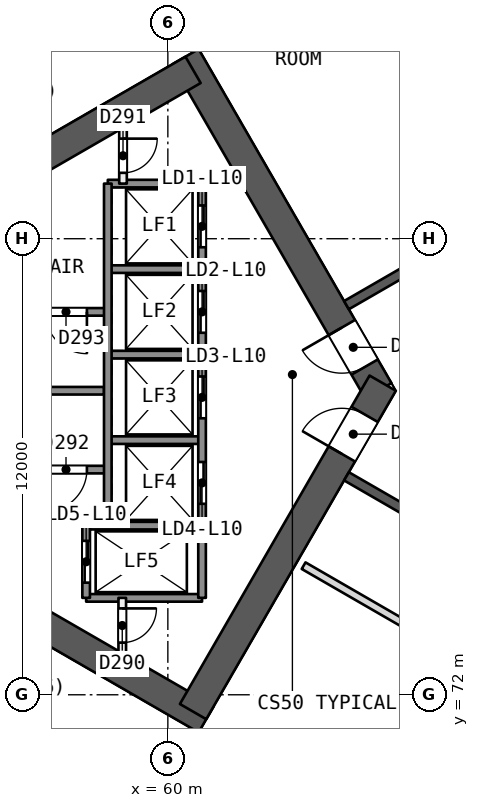
"""IFC4 building model, lengths in metres.
Left out: names, types, materials, properties, quantities, classifications, styles, units other than length and angle.
Written with IfcOpenShell. Run it as: python <this file> out.ifc"""

import sys

from ifc_helpers import new_model, si_unit, direction, frame, frame_2d, origin, place, context, subcontext, project, spatial, rectangle, extrude, element, fill, save


model = new_model("IFC4")
c1 = context("Model", 3, precision=1e-05, world=origin(), true_north=direction((0.0, 1.0)))
c2 = subcontext(c1, "Body", "Model", "MODEL_VIEW")
j1 = project(units=[si_unit("LENGTHUNIT", "METRE"), si_unit("PLANEANGLEUNIT", "RADIAN")], contexts=[c1])
p1 = place(None, origin())
s1 = spatial("IfcSite", under=j1, at=p1, CompositionType="ELEMENT")
p2 = place(p1, origin())
s2 = spatial("IfcBuilding", under=s1, at=p2, CompositionType="ELEMENT")
p3 = place(p2, frame((0.0, 0.0, 48.5)))
s3 = spatial("IfcBuildingStorey", under=s2, at=p3, CompositionType="ELEMENT", Elevation=48.5)
p4 = place(p3, frame((65.538, 80.0, 0.0), z_axis=(0.0, 0.0, 1.0), x_axis=(-0.49999662545, 0.866027352073, 0.0)))
e1 = element("IfcWall", 1, at=p4, inside=s3, PredefinedType="SHEAR", context=c2, shape_type="SweptSolid", body=[
    extrude(rectangle(XDim=10.149, YDim=0.8, at=frame_2d((5.074, 0.0))), origin(), (0.0, 0.0, 1.0), 4.4),
])
p5 = place(p4, frame((0.719, 0.0, 0.0)))
e2 = element("IfcOpeningElement", 2, at=p5, cuts=e1, PredefinedType="OPENING", context=c2, shape_type="SweptSolid", body=[
    extrude(rectangle(XDim=1.2, YDim=2.1, at=frame_2d((0.6, 1.05))), frame((0.0, 0.411, 0.0), z_axis=(0.0, -1.0, 0.0), x_axis=(1.0, 0.0, 0.0)), (0.0, 0.0, 1.0), 0.821),
])
p6 = place(p3, frame((60.664, 88.443, 0.0), z_axis=(0.0, 0.0, 1.0), x_axis=(-0.866029478545, -0.499992942241, 0.0)))
e3 = element("IfcWall", 3, at=p6, inside=s3, PredefinedType="SHEAR", context=c2, shape_type="SweptSolid", body=[
    extrude(rectangle(XDim=13.933, YDim=0.8, at=frame_2d((6.967, 0.0))), origin(), (0.0, 0.0, 1.0), 4.4),
])
p7 = place(p3, frame((48.797, 78.408, 0.0), z_axis=(0.0, 0.0, 1.0), x_axis=(0.866032504327, -0.499987701298, 0.0)))
e4 = element("IfcWall", 4, at=p7, inside=s3, PredefinedType="SHEAR", context=c2, shape_type="SweptSolid", body=[
    extrude(rectangle(XDim=14.102, YDim=0.8, at=frame_2d((7.051, 0.0))), origin(), (0.0, 0.0, 1.0), 4.4),
])
p8 = place(p3, frame((60.664, 71.557, 0.0), z_axis=(0.0, 0.0, 1.0), x_axis=(0.50000409368, 0.866023040284, 0.0)))
e5 = element("IfcWall", 5, at=p8, inside=s3, PredefinedType="SHEAR", context=c2, shape_type="SweptSolid", body=[
    extrude(rectangle(XDim=9.98, YDim=0.8, at=frame_2d((4.99, 0.0))), origin(), (0.0, 0.0, 1.0), 4.4),
])
p9 = place(p8, frame((7.83, 0.0, 0.0)))
e6 = element("IfcOpeningElement", 6, at=p9, cuts=e5, PredefinedType="OPENING", context=c2, shape_type="SweptSolid", body=[
    extrude(rectangle(XDim=1.2, YDim=2.1, at=frame_2d((0.6, 1.05))), frame((0.0, 0.411, 0.0), z_axis=(0.0, -1.0, 0.0), x_axis=(1.0, 0.0, 0.0)), (0.0, 0.0, 1.0), 0.821),
])
p10 = place(p3, frame((78.2, 90.046, 0.0), z_axis=(0.0, 0.0, 1.0), x_axis=(-0.866026492143, -0.499998114903, 0.0)))
e7 = element("IfcWall", 7, at=p10, inside=s3, PredefinedType="SHEAR", context=c2, shape_type="SweptSolid", body=[
    extrude(rectangle(XDim=15.588, YDim=0.25, at=frame_2d((7.794, 0.0))), origin(), (0.0, 0.0, 1.0), 3.9),
])
p11 = place(p10, frame((2.05, 0.0, 0.0)))
e8 = element("IfcOpeningElement", 8, at=p11, cuts=e7, PredefinedType="OPENING", context=c2, shape_type="SweptSolid", body=[
    extrude(rectangle(XDim=1.2, YDim=2.4, at=frame_2d((0.6, 1.2))), frame((0.0, 0.135, 0.0), z_axis=(0.0, -1.0, 0.0), x_axis=(1.0, 0.0, 0.0)), (0.0, 0.0, 1.0), 0.271),
])
p12 = place(p10, frame((7.272, 0.0, 0.0)))
e9 = element("IfcOpeningElement", 9, at=p12, cuts=e7, PredefinedType="OPENING", context=c2, shape_type="SweptSolid", body=[
    extrude(rectangle(XDim=1.2, YDim=2.4, at=frame_2d((0.6, 1.2))), frame((0.0, 0.135, 0.0), z_axis=(0.0, -1.0, 0.0), x_axis=(1.0, 0.0, 0.0)), (0.0, 0.0, 1.0), 0.271),
])
p13 = place(p10, frame((12.417, 0.0, 0.0)))
e10 = element("IfcOpeningElement", 10, at=p13, cuts=e7, PredefinedType="OPENING", context=c2, shape_type="SweptSolid", body=[
    extrude(rectangle(XDim=1.2, YDim=2.4, at=frame_2d((0.6, 1.2))), frame((0.0, 0.135, 0.0), z_axis=(0.0, -1.0, 0.0), x_axis=(1.0, 0.0, 0.0)), (0.0, 0.0, 1.0), 0.271),
])
p14 = place(p3, frame((64.7, 77.748, 0.0), z_axis=(0.0, 0.0, 1.0), x_axis=(0.866026492143, -0.499998114903, 0.0)))
e11 = element("IfcWall", 11, at=p14, inside=s3, PredefinedType="SHEAR", context=c2, shape_type="SweptSolid", body=[
    extrude(rectangle(XDim=15.588, YDim=0.25, at=frame_2d((7.794, 0.0))), origin(), (0.0, 0.0, 1.0), 3.9),
])
p15 = place(p14, frame((3.297, 0.0, 0.0)))
e12 = element("IfcOpeningElement", 12, at=p15, cuts=e11, PredefinedType="OPENING", context=c2, shape_type="SweptSolid", body=[
    extrude(rectangle(XDim=1.2, YDim=2.4, at=frame_2d((0.6, 1.2))), frame((0.0, 0.135, 0.0), z_axis=(0.0, -1.0, 0.0), x_axis=(1.0, 0.0, 0.0)), (0.0, 0.0, 1.0), 0.271),
])
p16 = place(p14, frame((9.143, 0.0, 0.0)))
e13 = element("IfcOpeningElement", 13, at=p16, cuts=e11, PredefinedType="OPENING", context=c2, shape_type="SweptSolid", body=[
    extrude(rectangle(XDim=1.2, YDim=2.4, at=frame_2d((0.6, 1.2))), frame((0.0, 0.135, 0.0), z_axis=(0.0, -1.0, 0.0), x_axis=(1.0, 0.0, 0.0)), (0.0, 0.0, 1.0), 0.271),
])
p17 = place(p14, frame((13.04, 0.0, 0.0)))
e14 = element("IfcOpeningElement", 14, at=p17, cuts=e11, PredefinedType="OPENING", context=c2, shape_type="SweptSolid", body=[
    extrude(rectangle(XDim=1.2, YDim=2.4, at=frame_2d((0.6, 1.2))), frame((0.0, 0.135, 0.0), z_axis=(0.0, -1.0, 0.0), x_axis=(1.0, 0.0, 0.0)), (0.0, 0.0, 1.0), 0.271),
])
p18 = place(p3, frame((62.216, 96.842, 0.0), z_axis=(0.0, 0.0, 1.0), x_axis=(0.499997074782, -0.866027092653, 0.0)))
e15 = element("IfcWall", 15, at=p18, inside=s3, PredefinedType="PARTITIONING", context=c2, shape_type="SweptSolid", body=[
    extrude(rectangle(XDim=13.877, YDim=0.2, at=frame_2d((6.939, 0.0))), origin(), (0.0, 0.0, 1.0), 3.9),
])
p19 = place(p3, frame((63.572, 75.397, 0.0), z_axis=(0.0, 0.0, 1.0), x_axis=(0.866024999478, -0.500000700278, 0.0)))
e16 = element("IfcWall", 16, at=p19, inside=s3, PredefinedType="PARTITIONING", context=c2, shape_type="SweptSolid", body=[
    extrude(rectangle(XDim=7.595, YDim=0.2, at=frame_2d((3.798, 0.0))), origin(), (0.0, 0.0, 1.0), 3.9),
])
p20 = place(p19, frame((3.198, 0.0, 0.0)))
e17 = element("IfcOpeningElement", 17, at=p20, cuts=e16, PredefinedType="OPENING", context=c2, shape_type="SweptSolid", body=[
    extrude(rectangle(XDim=1.2, YDim=2.4, at=frame_2d((0.6, 1.2))), frame((0.0, 0.11, 0.0), z_axis=(0.0, -1.0, 0.0), x_axis=(1.0, 0.0, 0.0)), (0.0, 0.0, 1.0), 0.221),
])
p21 = place(p3, frame((64.511, 61.833, 0.0), z_axis=(0.0, 0.0, 1.0), x_axis=(0.499997074782, 0.866027092653, 0.0)))
e18 = element("IfcWall", 18, at=p21, inside=s3, PredefinedType="PARTITIONING", context=c2, shape_type="SweptSolid", body=[
    extrude(rectangle(XDim=13.877, YDim=0.2, at=frame_2d((6.939, 0.0))), origin(), (0.0, 0.0, 1.0), 3.9),
])
p22 = place(p3, frame((38.131, 83.108, 0.0), z_axis=(0.0, 0.0, 1.0), x_axis=(0.866025105017, 0.50000051748, 0.0)))
e19 = element("IfcWall", 19, at=p22, inside=s3, PredefinedType="SOLIDWALL", context=c2, shape_type="SweptSolid", body=[
    extrude(rectangle(XDim=60.751, YDim=0.3, at=frame_2d((30.375, 0.0))), origin(), (0.0, 0.0, 1.0), 3.9),
])
p23 = place(p22, frame((3.562, 0.0, 0.6)))
e20 = element("IfcOpeningElement", 20, at=p23, cuts=e19, PredefinedType="OPENING", context=c2, shape_type="SweptSolid", body=[
    extrude(rectangle(XDim=3.0, YDim=2.4, at=frame_2d((1.5, 1.2))), frame((0.0, 0.161, 0.0), z_axis=(0.0, -1.0, 0.0), x_axis=(1.0, 0.0, 0.0)), (0.0, 0.0, 1.0), 0.321),
])
p24 = place(p22, frame((13.688, 0.0, 0.6)))
e21 = element("IfcOpeningElement", 21, at=p24, cuts=e19, PredefinedType="OPENING", context=c2, shape_type="SweptSolid", body=[
    extrude(rectangle(XDim=3.0, YDim=2.4, at=frame_2d((1.5, 1.2))), frame((0.0, 0.161, 0.0), z_axis=(0.0, -1.0, 0.0), x_axis=(1.0, 0.0, 0.0)), (0.0, 0.0, 1.0), 0.321),
])
p25 = place(p22, frame((23.813, 0.0, 0.6)))
e22 = element("IfcOpeningElement", 22, at=p25, cuts=e19, PredefinedType="OPENING", context=c2, shape_type="SweptSolid", body=[
    extrude(rectangle(XDim=3.0, YDim=2.4, at=frame_2d((1.5, 1.2))), frame((0.0, 0.161, 0.0), z_axis=(0.0, -1.0, 0.0), x_axis=(1.0, 0.0, 0.0)), (0.0, 0.0, 1.0), 0.321),
])
p26 = place(p22, frame((33.938, 0.0, 0.6)))
e23 = element("IfcOpeningElement", 23, at=p26, cuts=e19, PredefinedType="OPENING", context=c2, shape_type="SweptSolid", body=[
    extrude(rectangle(XDim=3.0, YDim=2.4, at=frame_2d((1.5, 1.2))), frame((0.0, 0.161, 0.0), z_axis=(0.0, -1.0, 0.0), x_axis=(1.0, 0.0, 0.0)), (0.0, 0.0, 1.0), 0.321),
])
p27 = place(p22, frame((44.063, 0.0, 0.6)))
e24 = element("IfcOpeningElement", 24, at=p27, cuts=e19, PredefinedType="OPENING", context=c2, shape_type="SweptSolid", body=[
    extrude(rectangle(XDim=3.0, YDim=2.4, at=frame_2d((1.5, 1.2))), frame((0.0, 0.161, 0.0), z_axis=(0.0, -1.0, 0.0), x_axis=(1.0, 0.0, 0.0)), (0.0, 0.0, 1.0), 0.321),
])
p28 = place(p22, frame((54.188, 0.0, 0.6)))
e25 = element("IfcOpeningElement", 25, at=p28, cuts=e19, PredefinedType="OPENING", context=c2, shape_type="SweptSolid", body=[
    extrude(rectangle(XDim=3.0, YDim=2.4, at=frame_2d((1.5, 1.2))), frame((0.0, 0.161, 0.0), z_axis=(0.0, -1.0, 0.0), x_axis=(1.0, 0.0, 0.0)), (0.0, 0.0, 1.0), 0.321),
])
p29 = place(p3, frame((90.743, 46.516, 0.0), z_axis=(0.0, 0.0, 1.0), x_axis=(-0.866025105017, 0.50000051748, 0.0)))
e26 = element("IfcWall", 26, at=p29, inside=s3, PredefinedType="SOLIDWALL", context=c2, shape_type="SweptSolid", body=[
    extrude(rectangle(XDim=60.751, YDim=0.3, at=frame_2d((30.375, 0.0))), origin(), (0.0, 0.0, 1.0), 3.9),
])
p30 = place(p29, frame((3.562, 0.0, 0.6)))
e27 = element("IfcOpeningElement", 27, at=p30, cuts=e26, PredefinedType="OPENING", context=c2, shape_type="SweptSolid", body=[
    extrude(rectangle(XDim=3.0, YDim=2.4, at=frame_2d((1.5, 1.2))), frame((0.0, 0.161, 0.0), z_axis=(0.0, -1.0, 0.0), x_axis=(1.0, 0.0, 0.0)), (0.0, 0.0, 1.0), 0.321),
])
p31 = place(p29, frame((13.688, 0.0, 0.6)))
e28 = element("IfcOpeningElement", 28, at=p31, cuts=e26, PredefinedType="OPENING", context=c2, shape_type="SweptSolid", body=[
    extrude(rectangle(XDim=3.0, YDim=2.4, at=frame_2d((1.5, 1.2))), frame((0.0, 0.161, 0.0), z_axis=(0.0, -1.0, 0.0), x_axis=(1.0, 0.0, 0.0)), (0.0, 0.0, 1.0), 0.321),
])
p32 = place(p29, frame((23.813, 0.0, 0.6)))
e29 = element("IfcOpeningElement", 29, at=p32, cuts=e26, PredefinedType="OPENING", context=c2, shape_type="SweptSolid", body=[
    extrude(rectangle(XDim=3.0, YDim=2.4, at=frame_2d((1.5, 1.2))), frame((0.0, 0.161, 0.0), z_axis=(0.0, -1.0, 0.0), x_axis=(1.0, 0.0, 0.0)), (0.0, 0.0, 1.0), 0.321),
])
p33 = place(p29, frame((33.938, 0.0, 0.6)))
e30 = element("IfcOpeningElement", 30, at=p33, cuts=e26, PredefinedType="OPENING", context=c2, shape_type="SweptSolid", body=[
    extrude(rectangle(XDim=3.0, YDim=2.4, at=frame_2d((1.5, 1.2))), frame((0.0, 0.161, 0.0), z_axis=(0.0, -1.0, 0.0), x_axis=(1.0, 0.0, 0.0)), (0.0, 0.0, 1.0), 0.321),
])
p34 = place(p29, frame((44.063, 0.0, 0.6)))
e31 = element("IfcOpeningElement", 31, at=p34, cuts=e26, PredefinedType="OPENING", context=c2, shape_type="SweptSolid", body=[
    extrude(rectangle(XDim=3.0, YDim=2.4, at=frame_2d((1.5, 1.2))), frame((0.0, 0.161, 0.0), z_axis=(0.0, -1.0, 0.0), x_axis=(1.0, 0.0, 0.0)), (0.0, 0.0, 1.0), 0.321),
])
p35 = place(p29, frame((54.188, 0.0, 0.6)))
e32 = element("IfcOpeningElement", 32, at=p35, cuts=e26, PredefinedType="OPENING", context=c2, shape_type="SweptSolid", body=[
    extrude(rectangle(XDim=3.0, YDim=2.4, at=frame_2d((1.5, 1.2))), frame((0.0, 0.161, 0.0), z_axis=(0.0, -1.0, 0.0), x_axis=(1.0, 0.0, 0.0)), (0.0, 0.0, 1.0), 0.321),
])
for number, where, z_axis, x_axis in (
    (33, (60.9, 85.45, 0.0), (0.0, 0.0, 1.0), (-1.0, 0.0, 0.0)),
    (34, (60.9, 83.2, 0.0), (0.0, 0.0, 1.0), (-1.0, 0.0, 0.0)),
):
    element("IfcWall", number, at=place(p3, frame(where, z_axis=z_axis, x_axis=x_axis)), inside=s3, PredefinedType="SOLIDWALL", context=c2, shape_type="SweptSolid", body=[
        extrude(rectangle(XDim=2.48, YDim=0.2, at=frame_2d((1.24, 0.0))), origin(), (0.0, 0.0, 1.0), 3.9),
    ])
p36 = place(p3, frame((58.42, 82.075, 0.0), z_axis=(0.0, 0.0, 1.0), x_axis=(-1.0, 0.0, 0.0)))
e35 = element("IfcWall", 35, at=p36, inside=s3, PredefinedType="SOLIDWALL", context=c2, shape_type="SweptSolid", body=[
    extrude(rectangle(XDim=7.7, YDim=0.2, at=frame_2d((3.85, 0.0))), origin(), (0.0, 0.0, 1.0), 3.9),
])
p37 = place(p36, frame((0.55, 0.0, 0.0)))
e36 = element("IfcOpeningElement", 36, at=p37, cuts=e35, PredefinedType="OPENING", context=c2, shape_type="SweptSolid", body=[
    extrude(rectangle(XDim=1.1, YDim=2.1, at=frame_2d((0.55, 1.05))), frame((0.0, 0.11, 0.0), z_axis=(0.0, -1.0, 0.0), x_axis=(1.0, 0.0, 0.0)), (0.0, 0.0, 1.0), 0.221),
])
p38 = place(p3, frame((60.9, 80.95, 0.0), z_axis=(0.0, 0.0, 1.0), x_axis=(-1.0, 0.0, 0.0)))
e37 = element("IfcWall", 37, at=p38, inside=s3, PredefinedType="SOLIDWALL", context=c2, shape_type="SweptSolid", body=[
    extrude(rectangle(XDim=2.48, YDim=0.2, at=frame_2d((1.24, 0.0))), origin(), (0.0, 0.0, 1.0), 3.9),
])
p39 = place(p3, frame((58.32, 80.0, 0.0), z_axis=(0.0, 0.0, 1.0), x_axis=(-1.0, 0.0, 0.0)))
e38 = element("IfcWall", 38, at=p39, inside=s3, PredefinedType="SOLIDWALL", context=c2, shape_type="SweptSolid", body=[
    extrude(rectangle(XDim=2.2, YDim=0.2, at=frame_2d((1.1, 0.0))), origin(), (0.0, 0.0, 1.0), 3.9),
])
p40 = place(p3, frame((60.9, 78.7, 0.0), z_axis=(0.0, 0.0, 1.0), x_axis=(-1.0, 0.0, 0.0)))
e39 = element("IfcWall", 39, at=p40, inside=s3, PredefinedType="SOLIDWALL", context=c2, shape_type="SweptSolid", body=[
    extrude(rectangle(XDim=2.48, YDim=0.2, at=frame_2d((1.24, 0.0))), origin(), (0.0, 0.0, 1.0), 3.9),
])
p41 = place(p3, frame((58.42, 77.925, 0.0), z_axis=(0.0, 0.0, 1.0), x_axis=(-1.0, 0.0, 0.0)))
e40 = element("IfcWall", 40, at=p41, inside=s3, PredefinedType="SOLIDWALL", context=c2, shape_type="SweptSolid", body=[
    extrude(rectangle(XDim=7.7, YDim=0.2, at=frame_2d((3.85, 0.0))), origin(), (0.0, 0.0, 1.0), 3.9),
])
p42 = place(p41, frame((0.55, 0.0, 0.0)))
e41 = element("IfcOpeningElement", 41, at=p42, cuts=e40, PredefinedType="OPENING", context=c2, shape_type="SweptSolid", body=[
    extrude(rectangle(XDim=1.1, YDim=2.1, at=frame_2d((0.55, 1.05))), frame((0.0, 0.11, 0.0), z_axis=(0.0, -1.0, 0.0), x_axis=(1.0, 0.0, 0.0)), (0.0, 0.0, 1.0), 0.221),
])
for number, where, z_axis, x_axis in (
    (42, (60.9, 76.45, 0.0), (0.0, 0.0, 1.0), (-1.0, 0.0, 0.0)),
    (43, (60.9, 74.55, 0.0), (0.0, 0.0, 1.0), (-1.0, 0.0, 0.0)),
):
    element("IfcWall", number, at=place(p3, frame(where, z_axis=z_axis, x_axis=x_axis)), inside=s3, PredefinedType="SOLIDWALL", context=c2, shape_type="SweptSolid", body=[
        extrude(rectangle(XDim=3.05, YDim=0.2, at=frame_2d((1.525, 0.0))), origin(), (0.0, 0.0, 1.0), 3.9),
    ])
p43 = place(p3, frame((60.9, 85.45, 0.0), z_axis=(0.0, 0.0, 1.0), x_axis=(0.0, -1.0, 0.0)))
e44 = element("IfcWall", 44, at=p43, inside=s3, PredefinedType="SOLIDWALL", context=c2, shape_type="SweptSolid", body=[
    extrude(rectangle(XDim=10.9, YDim=0.2, at=frame_2d((5.45, 0.0))), origin(), (0.0, 0.0, 1.0), 3.9),
])
p44 = place(p43, frame((0.575, 0.0, 0.0)))
e45 = element("IfcOpeningElement", 45, at=p44, cuts=e44, PredefinedType="OPENING", context=c2, shape_type="SweptSolid", body=[
    extrude(rectangle(XDim=1.1, YDim=2.1, at=frame_2d((0.55, 1.05))), frame((0.0, 0.11, 0.0), z_axis=(0.0, -1.0, 0.0), x_axis=(1.0, 0.0, 0.0)), (0.0, 0.0, 1.0), 0.221),
])
p45 = place(p43, frame((2.825, 0.0, 0.0)))
e46 = element("IfcOpeningElement", 46, at=p45, cuts=e44, PredefinedType="OPENING", context=c2, shape_type="SweptSolid", body=[
    extrude(rectangle(XDim=1.1, YDim=2.1, at=frame_2d((0.55, 1.05))), frame((0.0, 0.11, 0.0), z_axis=(0.0, -1.0, 0.0), x_axis=(1.0, 0.0, 0.0)), (0.0, 0.0, 1.0), 0.221),
])
p46 = place(p43, frame((5.075, 0.0, 0.0)))
e47 = element("IfcOpeningElement", 47, at=p46, cuts=e44, PredefinedType="OPENING", context=c2, shape_type="SweptSolid", body=[
    extrude(rectangle(XDim=1.1, YDim=2.1, at=frame_2d((0.55, 1.05))), frame((0.0, 0.11, 0.0), z_axis=(0.0, -1.0, 0.0), x_axis=(1.0, 0.0, 0.0)), (0.0, 0.0, 1.0), 0.221),
])
p47 = place(p43, frame((7.325, 0.0, 0.0)))
e48 = element("IfcOpeningElement", 48, at=p47, cuts=e44, PredefinedType="OPENING", context=c2, shape_type="SweptSolid", body=[
    extrude(rectangle(XDim=1.1, YDim=2.1, at=frame_2d((0.55, 1.05))), frame((0.0, 0.11, 0.0), z_axis=(0.0, -1.0, 0.0), x_axis=(1.0, 0.0, 0.0)), (0.0, 0.0, 1.0), 0.221),
])
p48 = place(p3, frame((58.82, 86.917, 0.0), z_axis=(0.0, 0.0, 1.0), x_axis=(0.0, -1.0, 0.0)))
e49 = element("IfcWall", 49, at=p48, inside=s3, PredefinedType="PARTITIONING", context=c2, shape_type="SweptSolid", body=[
    extrude(rectangle(XDim=1.467, YDim=0.2, at=frame_2d((0.733, 0.0))), origin(), (0.0, 0.0, 1.0), 3.9),
])
p49 = place(p48, frame((0.283, 0.0, 0.0)))
e50 = element("IfcOpeningElement", 50, at=p49, cuts=e49, PredefinedType="OPENING", context=c2, shape_type="SweptSolid", body=[
    extrude(rectangle(XDim=0.9, YDim=2.1, at=frame_2d((0.45, 1.05))), frame((0.0, 0.11, 0.0), z_axis=(0.0, -1.0, 0.0), x_axis=(1.0, 0.0, 0.0)), (0.0, 0.0, 1.0), 0.221),
])
p50 = place(p3, frame((58.8, 74.55, 0.0), z_axis=(0.0, 0.0, 1.0), x_axis=(0.0, -1.0, 0.0)))
e51 = element("IfcWall", 51, at=p50, inside=s3, PredefinedType="PARTITIONING", context=c2, shape_type="SweptSolid", body=[
    extrude(rectangle(XDim=1.455, YDim=0.2, at=frame_2d((0.728, 0.0))), origin(), (0.0, 0.0, 1.0), 3.9),
])
p51 = place(p50, frame((0.278, 0.0, 0.0)))
e52 = element("IfcOpeningElement", 52, at=p51, cuts=e51, PredefinedType="OPENING", context=c2, shape_type="SweptSolid", body=[
    extrude(rectangle(XDim=0.9, YDim=2.1, at=frame_2d((0.45, 1.05))), frame((0.0, 0.11, 0.0), z_axis=(0.0, -1.0, 0.0), x_axis=(1.0, 0.0, 0.0)), (0.0, 0.0, 1.0), 0.221),
])
p52 = place(p3, frame((58.42, 85.45, 0.0), z_axis=(0.0, 0.0, 1.0), x_axis=(0.0, -1.0, 0.0)))
e53 = element("IfcWall", 53, at=p52, inside=s3, PredefinedType="SOLIDWALL", context=c2, shape_type="SweptSolid", body=[
    extrude(rectangle(XDim=9.0, YDim=0.2, at=frame_2d((4.5, 0.0))), origin(), (0.0, 0.0, 1.0), 3.9),
])
p53 = place(p3, frame((57.85, 76.45, 0.0), z_axis=(0.0, 0.0, 1.0), x_axis=(0.0, -1.0, 0.0)))
e54 = element("IfcWall", 54, at=p53, inside=s3, PredefinedType="SOLIDWALL", context=c2, shape_type="SweptSolid", body=[
    extrude(rectangle(XDim=1.9, YDim=0.2, at=frame_2d((0.95, 0.0))), origin(), (0.0, 0.0, 1.0), 3.9),
])
p54 = place(p53, frame((0.4, 0.0, 0.0)))
e55 = element("IfcOpeningElement", 55, at=p54, cuts=e54, PredefinedType="OPENING", context=c2, shape_type="SweptSolid", body=[
    extrude(rectangle(XDim=1.1, YDim=2.1, at=frame_2d((0.55, 1.05))), frame((0.0, 0.11, 0.0), z_axis=(0.0, -1.0, 0.0), x_axis=(1.0, 0.0, 0.0)), (0.0, 0.0, 1.0), 0.221),
])
p55 = place(p5, origin())
e56 = element("IfcDoor", 56, at=p55, inside=s3, OperationType="SINGLE_SWING_RIGHT", PredefinedType="NOTDEFINED", context=c2, shape_type="SweptSolid", body=[
    extrude(rectangle(XDim=1.2, YDim=2.1, at=frame_2d((0.6, 1.05))), frame((0.0, 0.025, 0.0), z_axis=(0.0, -1.0, 0.0), x_axis=(1.0, 0.0, 0.0)), (0.0, 0.0, 1.0), 0.05),
])
fill(e2, e56)
p56 = place(p9, origin())
e57 = element("IfcDoor", 57, at=p56, inside=s3, OperationType="SINGLE_SWING_LEFT", PredefinedType="NOTDEFINED", context=c2, shape_type="SweptSolid", body=[
    extrude(rectangle(XDim=1.2, YDim=2.1, at=frame_2d((0.6, 1.05))), frame((0.0, 0.025, 0.0), z_axis=(0.0, -1.0, 0.0), x_axis=(1.0, 0.0, 0.0)), (0.0, 0.0, 1.0), 0.05),
])
fill(e6, e57)
p57 = place(p44, origin())
e58 = element("IfcDoor", 58, at=p57, inside=s3, OperationType="SLIDING_TO_RIGHT", PredefinedType="NOTDEFINED", context=c2, shape_type="SweptSolid", body=[
    extrude(rectangle(XDim=1.1, YDim=2.1, at=frame_2d((0.55, 1.05))), frame((0.0, 0.025, 0.0), z_axis=(0.0, -1.0, 0.0), x_axis=(1.0, 0.0, 0.0)), (0.0, 0.0, 1.0), 0.05),
])
fill(e45, e58)
p58 = place(p45, origin())
e59 = element("IfcDoor", 59, at=p58, inside=s3, OperationType="SLIDING_TO_LEFT", PredefinedType="NOTDEFINED", context=c2, shape_type="SweptSolid", body=[
    extrude(rectangle(XDim=1.1, YDim=2.1, at=frame_2d((0.55, 1.05))), frame((0.0, 0.025, 0.0), z_axis=(0.0, -1.0, 0.0), x_axis=(1.0, 0.0, 0.0)), (0.0, 0.0, 1.0), 0.05),
])
fill(e46, e59)
p59 = place(p46, origin())
e60 = element("IfcDoor", 60, at=p59, inside=s3, OperationType="SLIDING_TO_RIGHT", PredefinedType="NOTDEFINED", context=c2, shape_type="SweptSolid", body=[
    extrude(rectangle(XDim=1.1, YDim=2.1, at=frame_2d((0.55, 1.05))), frame((0.0, 0.025, 0.0), z_axis=(0.0, -1.0, 0.0), x_axis=(1.0, 0.0, 0.0)), (0.0, 0.0, 1.0), 0.05),
])
fill(e47, e60)
p60 = place(p47, origin())
e61 = element("IfcDoor", 61, at=p60, inside=s3, OperationType="SLIDING_TO_LEFT", PredefinedType="NOTDEFINED", context=c2, shape_type="SweptSolid", body=[
    extrude(rectangle(XDim=1.1, YDim=2.1, at=frame_2d((0.55, 1.05))), frame((0.0, 0.025, 0.0), z_axis=(0.0, -1.0, 0.0), x_axis=(1.0, 0.0, 0.0)), (0.0, 0.0, 1.0), 0.05),
])
fill(e48, e61)
p61 = place(p54, origin())
e62 = element("IfcDoor", 62, at=p61, inside=s3, OperationType="SLIDING_TO_RIGHT", PredefinedType="NOTDEFINED", context=c2, shape_type="SweptSolid", body=[
    extrude(rectangle(XDim=1.1, YDim=2.1, at=frame_2d((0.55, 1.05))), frame((0.0, 0.025, 0.0), z_axis=(0.0, -1.0, 0.0), x_axis=(1.0, 0.0, 0.0)), (0.0, 0.0, 1.0), 0.05),
])
fill(e55, e62)
p62 = place(p51, origin())
e63 = element("IfcDoor", 63, at=p62, inside=s3, OperationType="SINGLE_SWING_LEFT", PredefinedType="NOTDEFINED", context=c2, shape_type="SweptSolid", body=[
    extrude(rectangle(XDim=0.9, YDim=2.1, at=frame_2d((0.45, 1.05))), frame((0.0, 0.025, 0.0), z_axis=(0.0, -1.0, 0.0), x_axis=(1.0, 0.0, 0.0)), (0.0, 0.0, 1.0), 0.05),
])
fill(e52, e63)
p63 = place(p49, origin())
e64 = element("IfcDoor", 64, at=p63, inside=s3, OperationType="SINGLE_SWING_LEFT", PredefinedType="NOTDEFINED", context=c2, shape_type="SweptSolid", body=[
    extrude(rectangle(XDim=0.9, YDim=2.1, at=frame_2d((0.45, 1.05))), frame((0.0, 0.025, 0.0), z_axis=(0.0, -1.0, 0.0), x_axis=(1.0, 0.0, 0.0)), (0.0, 0.0, 1.0), 0.05),
])
fill(e50, e64)
p64 = place(p42, origin())
e65 = element("IfcDoor", 65, at=p64, inside=s3, OperationType="SINGLE_SWING_RIGHT", PredefinedType="NOTDEFINED", context=c2, shape_type="SweptSolid", body=[
    extrude(rectangle(XDim=1.1, YDim=2.1, at=frame_2d((0.55, 1.05))), frame((0.0, 0.025, 0.0), z_axis=(0.0, -1.0, 0.0), x_axis=(1.0, 0.0, 0.0)), (0.0, 0.0, 1.0), 0.05),
])
fill(e41, e65)
p65 = place(p37, origin())
e66 = element("IfcDoor", 66, at=p65, inside=s3, OperationType="SINGLE_SWING_LEFT", PredefinedType="NOTDEFINED", context=c2, shape_type="SweptSolid", body=[
    extrude(rectangle(XDim=1.1, YDim=2.1, at=frame_2d((0.55, 1.05))), frame((0.0, 0.025, 0.0), z_axis=(0.0, -1.0, 0.0), x_axis=(1.0, 0.0, 0.0)), (0.0, 0.0, 1.0), 0.05),
])
fill(e36, e66)
save(model, sys.argv[1])
